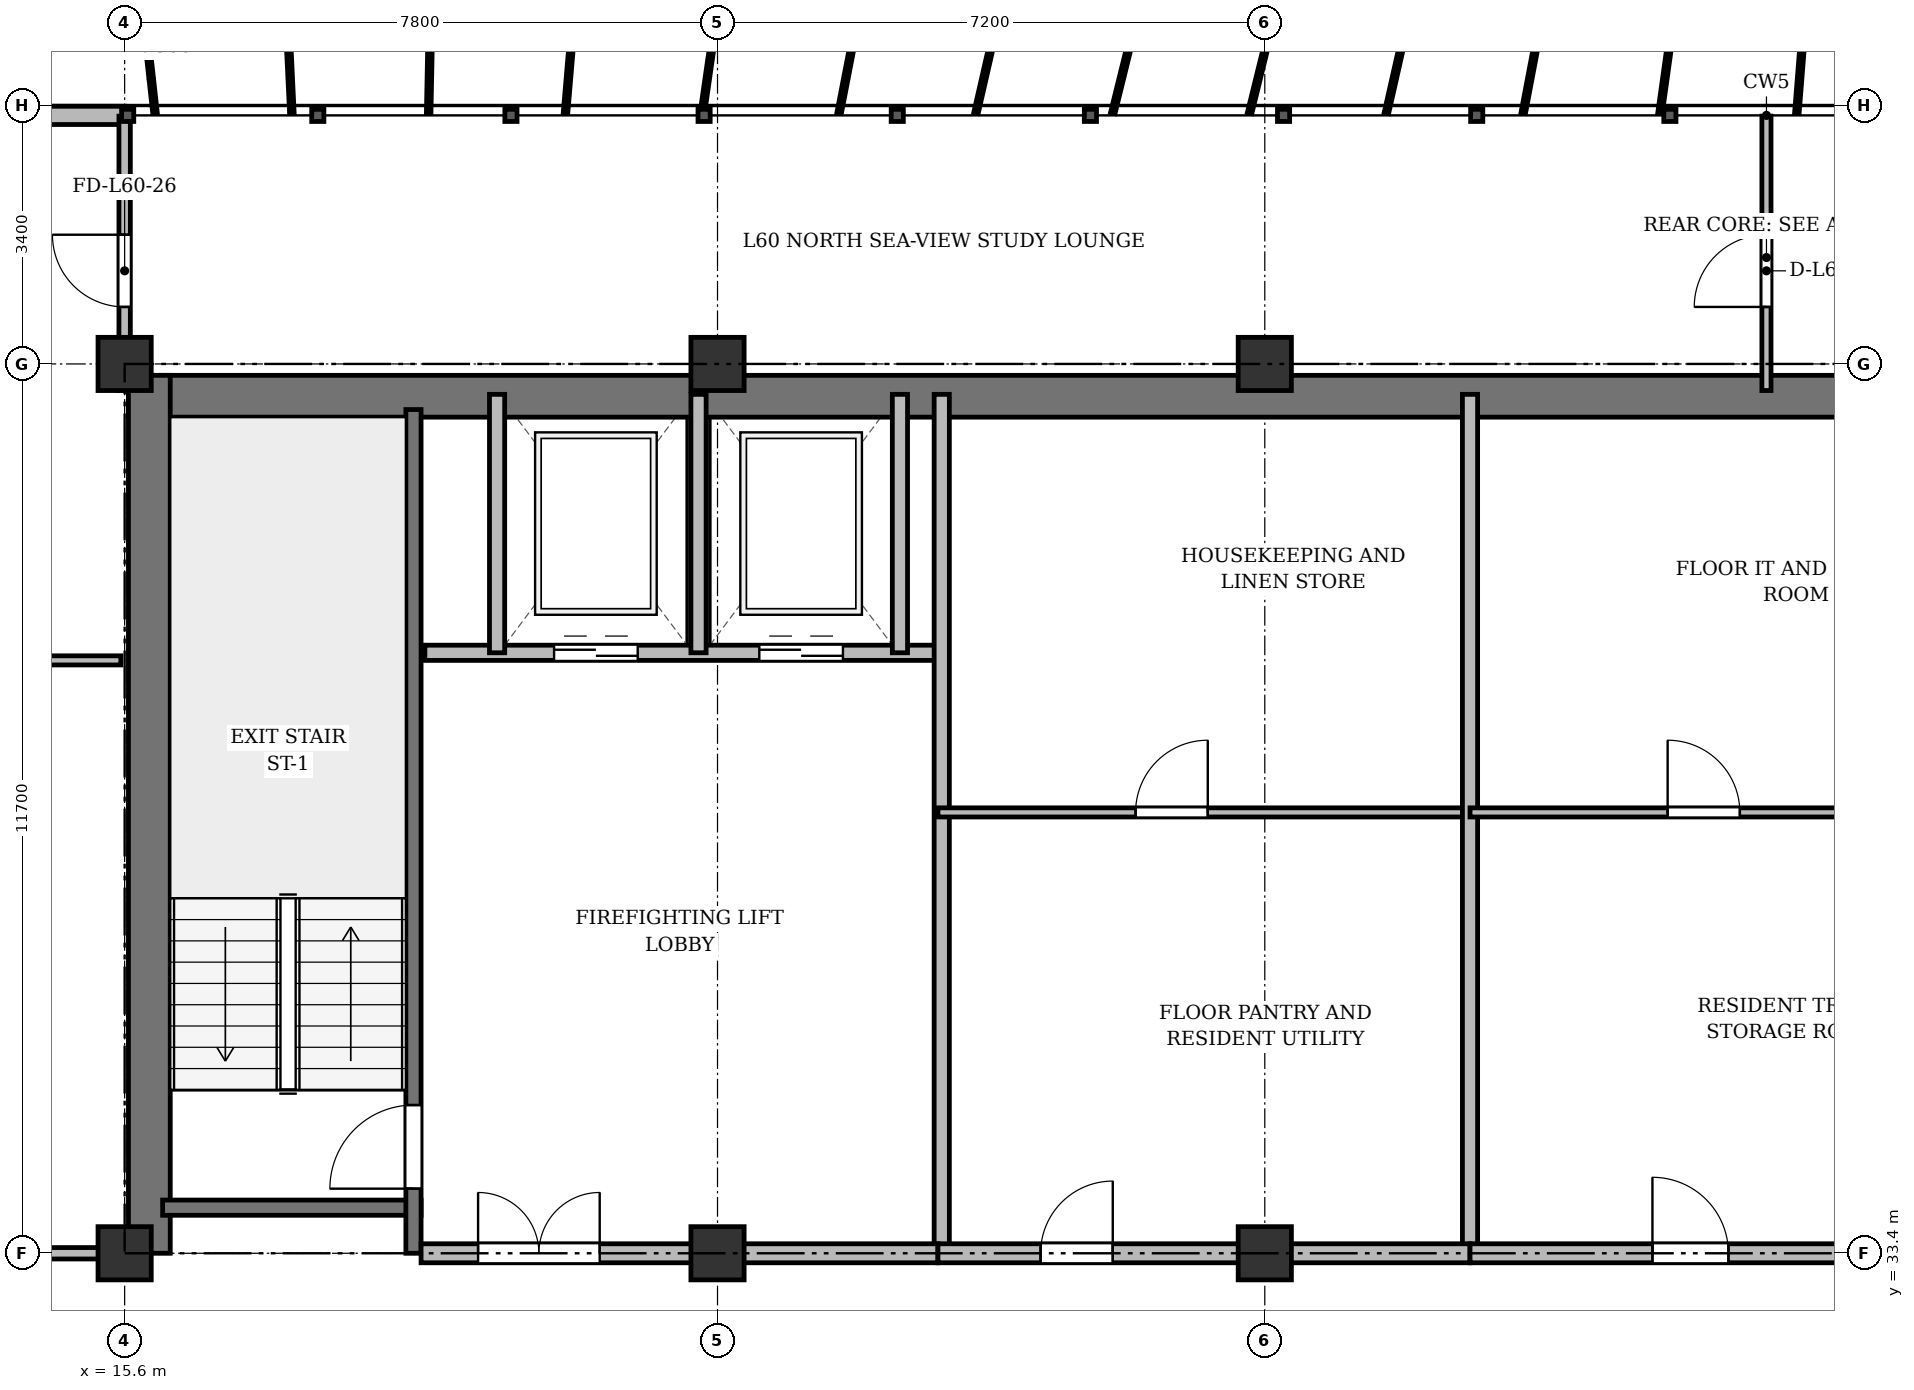
"""IFC4 building model, lengths in metres.
Left out: names, types, materials, properties, quantities, classifications, styles, units other than length and angle.
Written with IfcOpenShell. Run it as: python <this file> out.ifc"""

import sys

from ifc_helpers import new_model, si_unit, direction, frame, frame_2d, origin, origin_2d, place, context, subcontext, project, spatial, rectangle, extrude, source, transform, mapped, element, fill, save


model = new_model("IFC4")
c1 = context("Model", 3, precision=1e-05, world=origin(), true_north=direction((0.0, 1.0)))
c2 = subcontext(c1, "Body", "Model", "MODEL_VIEW")
j1 = project(units=[si_unit("LENGTHUNIT", "METRE"), si_unit("PLANEANGLEUNIT", "RADIAN")], contexts=[c1])
p1 = place(None, origin())
s1 = spatial("IfcSite", under=j1, at=p1, CompositionType="ELEMENT")
p2 = place(p1, origin())
s2 = spatial("IfcBuilding", under=s1, at=p2, CompositionType="ELEMENT")
p3 = place(p2, frame((0.0, 0.0, 230.1)))
s3 = spatial("IfcBuildingStorey", under=s2, at=p3, CompositionType="ELEMENT", Elevation=230.1)
m1 = source(origin(), c2, "Body", "SweptSolid", [
    extrude(rectangle(XDim=0.7, YDim=0.7, at=origin_2d()), origin(), (0.0, 0.0, 1.0), 3.6),
])
for number, where, z_axis, x_axis in (
    (1, (15.6, 33.4, 0.0), (0.0, 0.0, 1.0), (1.0, 0.0, 0.0)),
    (2, (15.6, 45.1, 0.0), (0.0, 0.0, 1.0), (1.0, 0.0, 0.0)),
    (3, (23.4, 33.4, 0.0), (0.0, 0.0, 1.0), (1.0, 0.0, 0.0)),
    (4, (23.4, 45.1, 0.0), (0.0, 0.0, 1.0), (1.0, 0.0, 0.0)),
    (5, (30.6, 33.4, 0.0), (0.0, 0.0, 1.0), (1.0, 0.0, 0.0)),
    (6, (30.6, 45.1, 0.0), (0.0, 0.0, 1.0), (1.0, 0.0, 0.0)),
):
    element("IfcColumn", number, at=place(p3, frame(where, z_axis=z_axis, x_axis=x_axis)), inside=s3, PredefinedType="COLUMN", context=c2, shape_type="MappedRepresentation", body=[
        mapped(m1, transform((0.0, 0.0, 0.0), x_axis=(1.0, 0.0, 0.0), y_axis=(0.0, 1.0, 0.0), z_axis=(0.0, 0.0, 1.0), scale=1.0)),
    ])
p4 = place(p3, frame((11.1, 48.37, 0.0), z_axis=(0.0, 0.0, 1.0), x_axis=(1.0, 0.0, 0.0)))
e7 = element("IfcWall", 7, at=p4, inside=s3, PredefinedType="SOLIDWALL", context=c2, shape_type="SweptSolid", body=[
    extrude(rectangle(XDim=4.5, YDim=0.24, at=frame_2d((2.25, 0.0))), origin(), (0.0, 0.0, 1.0), 3.36),
])
p5 = place(p4, frame((1.65, 0.0, 0.9)))
e8 = element("IfcOpeningElement", 8, at=p5, cuts=e7, PredefinedType="OPENING", context=c2, shape_type="SweptSolid", body=[
    extrude(rectangle(XDim=1.2, YDim=1.65, at=frame_2d((0.6, 0.825))), frame((0.0, 0.13, 0.0), z_axis=(0.0, -1.0, 0.0), x_axis=(1.0, 0.0, 0.0)), (0.0, 0.0, 1.0), 0.26),
])
p6 = place(p3, frame((15.65, 44.675, 0.0), z_axis=(0.0, 0.0, 1.0), x_axis=(1.0, 0.0, 0.0)))
e9 = element("IfcWall", 9, at=p6, inside=s3, PredefinedType="SHEAR", context=c2, shape_type="SweptSolid", body=[
    extrude(rectangle(XDim=43.1, YDim=0.55, at=frame_2d((21.55, 0.0))), origin(), (0.0, 0.0, 1.0), 3.36),
])
p7 = place(p3, frame((15.925, 33.4, 0.0), z_axis=(0.0, 0.0, 1.0), x_axis=(0.0, 1.0, 0.0)))
e10 = element("IfcWall", 10, at=p7, inside=s3, PredefinedType="SHEAR", context=c2, shape_type="SweptSolid", body=[
    extrude(rectangle(XDim=11.55, YDim=0.55, at=frame_2d((5.775, 0.0))), origin(), (0.0, 0.0, 1.0), 3.36),
])
p8 = place(p3, frame((16.1, 34.0, 0.0), z_axis=(0.0, 0.0, 1.0), x_axis=(1.0, 0.0, 0.0)))
e11 = element("IfcWall", 11, at=p8, inside=s3, PredefinedType="SHEAR", context=c2, shape_type="SweptSolid", body=[
    extrude(rectangle(XDim=3.4, YDim=0.2, at=frame_2d((1.7, 0.0))), origin(), (0.0, 0.0, 1.0), 3.36),
])
p9 = place(p3, frame((19.4, 33.4, 0.0), z_axis=(0.0, 0.0, 1.0), x_axis=(0.0, 1.0, 0.0)))
e12 = element("IfcWall", 12, at=p9, inside=s3, PredefinedType="SHEAR", context=c2, shape_type="SweptSolid", body=[
    extrude(rectangle(XDim=11.1, YDim=0.2, at=frame_2d((5.55, 0.0))), origin(), (0.0, 0.0, 1.0), 3.36),
])
p10 = place(p9, frame((0.85, 0.0, 0.0)))
e13 = element("IfcOpeningElement", 13, at=p10, cuts=e12, PredefinedType="OPENING", context=c2, shape_type="SweptSolid", body=[
    extrude(rectangle(XDim=1.1, YDim=2.15, at=frame_2d((0.55, 1.075))), frame((0.0, 0.11, 0.0), z_axis=(0.0, -1.0, 0.0), x_axis=(1.0, 0.0, 0.0)), (0.0, 0.0, 1.0), 0.22),
])
p11 = place(p3, frame((19.55, 41.3, 0.0), z_axis=(0.0, 0.0, 1.0), x_axis=(1.0, 0.0, 0.0)))
e14 = element("IfcWall", 14, at=p11, inside=s3, PredefinedType="SOLIDWALL", context=c2, shape_type="SweptSolid", body=[
    extrude(rectangle(XDim=6.75, YDim=0.2, at=frame_2d((3.375, 0.0))), origin(), (0.0, 0.0, 1.0), 3.36),
])
p12 = place(p11, frame((1.7, 0.0, 0.0)))
e15 = element("IfcOpeningElement", 15, at=p12, cuts=e14, PredefinedType="OPENING", context=c2, shape_type="SweptSolid", body=[
    extrude(rectangle(XDim=1.1, YDim=2.15, at=frame_2d((0.55, 1.075))), frame((0.0, 0.11, 0.0), z_axis=(0.0, -1.0, 0.0), x_axis=(1.0, 0.0, 0.0)), (0.0, 0.0, 1.0), 0.22),
])
p13 = place(p11, frame((4.4, 0.0, 0.0)))
e16 = element("IfcOpeningElement", 16, at=p13, cuts=e14, PredefinedType="OPENING", context=c2, shape_type="SweptSolid", body=[
    extrude(rectangle(XDim=1.1, YDim=2.15, at=frame_2d((0.55, 1.075))), frame((0.0, 0.11, 0.0), z_axis=(0.0, -1.0, 0.0), x_axis=(1.0, 0.0, 0.0)), (0.0, 0.0, 1.0), 0.22),
])
for number, where, z_axis, x_axis in (
    (17, (20.5, 41.3, 0.0), (0.0, 0.0, 1.0), (0.0, 1.0, 0.0)),
    (18, (23.15, 41.3, 0.0), (0.0, 0.0, 1.0), (0.0, 1.0, 0.0)),
    (19, (25.8, 41.3, 0.0), (0.0, 0.0, 1.0), (0.0, 1.0, 0.0)),
):
    element("IfcWall", number, at=place(p3, frame(where, z_axis=z_axis, x_axis=x_axis)), inside=s3, PredefinedType="SOLIDWALL", context=c2, shape_type="SweptSolid", body=[
        extrude(rectangle(XDim=3.4, YDim=0.2, at=frame_2d((1.7, 0.0))), origin(), (0.0, 0.0, 1.0), 3.36),
    ])
p14 = place(p3, frame((26.35, 33.4, 0.0), z_axis=(0.0, 0.0, 1.0), x_axis=(0.0, 1.0, 0.0)))
e20 = element("IfcWall", 20, at=p14, inside=s3, PredefinedType="SOLIDWALL", context=c2, shape_type="SweptSolid", body=[
    extrude(rectangle(XDim=11.3, YDim=0.2, at=frame_2d((5.65, 0.0))), origin(), (0.0, 0.0, 1.0), 2.91),
])
p15 = place(p3, frame((19.5, 33.4, 0.0), z_axis=(0.0, 0.0, 1.0), x_axis=(1.0, 0.0, 0.0)))
e21 = element("IfcWall", 21, at=p15, inside=s3, PredefinedType="PARTITIONING", context=c2, shape_type="SweptSolid", body=[
    extrude(rectangle(XDim=6.8, YDim=0.25, at=frame_2d((3.4, 0.0))), origin(), (0.0, 0.0, 1.0), 2.91),
])
p16 = place(p15, frame((0.75, 0.0, 0.0)))
e22 = element("IfcOpeningElement", 22, at=p16, cuts=e21, PredefinedType="OPENING", context=c2, shape_type="SweptSolid", body=[
    extrude(rectangle(XDim=1.6, YDim=2.2, at=frame_2d((0.8, 1.1))), frame((0.0, 0.135, 0.0), z_axis=(0.0, -1.0, 0.0), x_axis=(1.0, 0.0, 0.0)), (0.0, 0.0, 1.0), 0.27),
])
p17 = place(p3, frame((26.3, 39.2, 0.0), z_axis=(0.0, 0.0, 1.0), x_axis=(1.0, 0.0, 0.0)))
e23 = element("IfcWall", 23, at=p17, inside=s3, PredefinedType="PARTITIONING", context=c2, shape_type="SweptSolid", body=[
    extrude(rectangle(XDim=7.0, YDim=0.12, at=frame_2d((3.5, 0.0))), origin(), (0.0, 0.0, 1.0), 2.86),
])
p18 = place(p17, frame((2.6, 0.0, 0.0)))
e24 = element("IfcOpeningElement", 24, at=p18, cuts=e23, PredefinedType="OPENING", context=c2, shape_type="SweptSolid", body=[
    extrude(rectangle(XDim=0.95, YDim=2.15, at=frame_2d((0.475, 1.075))), frame((0.0, 0.07, 0.0), z_axis=(0.0, -1.0, 0.0), x_axis=(1.0, 0.0, 0.0)), (0.0, 0.0, 1.0), 0.14),
])
p19 = place(p3, frame((33.3, 33.4, 0.0), z_axis=(0.0, 0.0, 1.0), x_axis=(0.0, 1.0, 0.0)))
e25 = element("IfcWall", 25, at=p19, inside=s3, PredefinedType="SOLIDWALL", context=c2, shape_type="SweptSolid", body=[
    extrude(rectangle(XDim=11.3, YDim=0.2, at=frame_2d((5.65, 0.0))), origin(), (0.0, 0.0, 1.0), 2.91),
])
p20 = place(p3, frame((33.3, 39.2, 0.0), z_axis=(0.0, 0.0, 1.0), x_axis=(1.0, 0.0, 0.0)))
e26 = element("IfcWall", 26, at=p20, inside=s3, PredefinedType="PARTITIONING", context=c2, shape_type="SweptSolid", body=[
    extrude(rectangle(XDim=6.8, YDim=0.12, at=frame_2d((3.4, 0.0))), origin(), (0.0, 0.0, 1.0), 3.36),
])
p21 = place(p20, frame((2.6, 0.0, 0.0)))
e27 = element("IfcOpeningElement", 27, at=p21, cuts=e26, PredefinedType="OPENING", context=c2, shape_type="SweptSolid", body=[
    extrude(rectangle(XDim=0.95, YDim=2.15, at=frame_2d((0.475, 1.075))), frame((0.0, 0.07, 0.0), z_axis=(0.0, -1.0, 0.0), x_axis=(1.0, 0.0, 0.0)), (0.0, 0.0, 1.0), 0.14),
])
p22 = place(p3, frame((26.3, 33.4, 0.0), z_axis=(0.0, 0.0, 1.0), x_axis=(1.0, 0.0, 0.0)))
e28 = element("IfcWall", 28, at=p22, inside=s3, PredefinedType="PARTITIONING", context=c2, shape_type="SweptSolid", body=[
    extrude(rectangle(XDim=7.0, YDim=0.25, at=frame_2d((3.5, 0.0))), origin(), (0.0, 0.0, 1.0), 2.91),
])
p23 = place(p22, frame((1.35, 0.0, 0.0)))
e29 = element("IfcOpeningElement", 29, at=p23, cuts=e28, PredefinedType="OPENING", context=c2, shape_type="SweptSolid", body=[
    extrude(rectangle(XDim=0.95, YDim=2.15, at=frame_2d((0.475, 1.075))), frame((0.0, 0.135, 0.0), z_axis=(0.0, -1.0, 0.0), x_axis=(1.0, 0.0, 0.0)), (0.0, 0.0, 1.0), 0.27),
])
p24 = place(p3, frame((33.3, 33.4, 0.0), z_axis=(0.0, 0.0, 1.0), x_axis=(1.0, 0.0, 0.0)))
e30 = element("IfcWall", 30, at=p24, inside=s3, PredefinedType="PARTITIONING", context=c2, shape_type="SweptSolid", body=[
    extrude(rectangle(XDim=6.8, YDim=0.25, at=frame_2d((3.4, 0.0))), origin(), (0.0, 0.0, 1.0), 2.91),
])
p25 = place(p24, frame((2.4, 0.0, 0.0)))
e31 = element("IfcOpeningElement", 31, at=p25, cuts=e30, PredefinedType="OPENING", context=c2, shape_type="SweptSolid", body=[
    extrude(rectangle(XDim=1.0, YDim=2.15, at=frame_2d((0.5, 1.075))), frame((0.0, 0.135, 0.0), z_axis=(0.0, -1.0, 0.0), x_axis=(1.0, 0.0, 0.0)), (0.0, 0.0, 1.0), 0.27),
])
p26 = place(p3, frame((8.3, 41.2, 0.0), z_axis=(0.0, 0.0, 1.0), x_axis=(1.0, 0.0, 0.0)))
e32 = element("IfcWall", 32, at=p26, inside=s3, PredefinedType="PARTITIONING", context=c2, shape_type="SweptSolid", body=[
    extrude(rectangle(XDim=7.25, YDim=0.12, at=frame_2d((3.625, 0.0))), origin(), (0.0, 0.0, 1.0), 2.86),
])
p27 = place(p26, frame((3.15, 0.0, 0.0)))
e33 = element("IfcOpeningElement", 33, at=p27, cuts=e32, PredefinedType="OPENING", context=c2, shape_type="SweptSolid", body=[
    extrude(rectangle(XDim=0.95, YDim=2.15, at=frame_2d((0.475, 1.075))), frame((0.0, 0.07, 0.0), z_axis=(0.0, -1.0, 0.0), x_axis=(1.0, 0.0, 0.0)), (0.0, 0.0, 1.0), 0.14),
])
p28 = place(p3, frame((8.25, 33.4, 0.0), z_axis=(0.0, 0.0, 1.0), x_axis=(1.0, 0.0, 0.0)))
e34 = element("IfcWall", 34, at=p28, inside=s3, PredefinedType="PARTITIONING", context=c2, shape_type="SweptSolid", body=[
    extrude(rectangle(XDim=7.35, YDim=0.15, at=frame_2d((3.675, 0.0))), origin(), (0.0, 0.0, 1.0), 2.91),
])
p29 = place(p28, frame((3.192, 0.0, 0.0)))
e35 = element("IfcOpeningElement", 35, at=p29, cuts=e34, PredefinedType="OPENING", context=c2, shape_type="SweptSolid", body=[
    extrude(rectangle(XDim=0.95, YDim=2.15, at=frame_2d((0.475, 1.075))), frame((0.0, 0.085, 0.0), z_axis=(0.0, -1.0, 0.0), x_axis=(1.0, 0.0, 0.0)), (0.0, 0.0, 1.0), 0.17),
])
p30 = place(p3, frame((37.2, 44.75, 0.0), z_axis=(0.0, 0.0, 1.0), x_axis=(0.0, 1.0, 0.0)))
e36 = element("IfcWall", 36, at=p30, inside=s3, PredefinedType="PARTITIONING", context=c2, shape_type="SweptSolid", body=[
    extrude(rectangle(XDim=3.61, YDim=0.12, at=frame_2d((1.805, 0.0))), origin(), (0.0, 0.0, 1.0), 2.91),
])
p31 = place(p30, frame((1.1, 0.0, 0.0)))
e37 = element("IfcOpeningElement", 37, at=p31, cuts=e36, PredefinedType="OPENING", context=c2, shape_type="SweptSolid", body=[
    extrude(rectangle(XDim=0.95, YDim=2.15, at=frame_2d((0.475, 1.075))), frame((0.0, 0.07, 0.0), z_axis=(0.0, -1.0, 0.0), x_axis=(1.0, 0.0, 0.0)), (0.0, 0.0, 1.0), 0.14),
])
p32 = place(p3, frame((15.6, 44.75, 0.0), z_axis=(0.0, 0.0, 1.0), x_axis=(0.0, 1.0, 0.0)))
e38 = element("IfcWall", 38, at=p32, inside=s3, PredefinedType="PARTITIONING", context=c2, shape_type="SweptSolid", body=[
    extrude(rectangle(XDim=3.61, YDim=0.15, at=frame_2d((1.805, 0.0))), origin(), (0.0, 0.0, 1.0), 2.86),
])
p33 = place(p32, frame((1.1, 0.0, 0.0)))
e39 = element("IfcOpeningElement", 39, at=p33, cuts=e38, PredefinedType="OPENING", context=c2, shape_type="SweptSolid", body=[
    extrude(rectangle(XDim=0.95, YDim=2.15, at=frame_2d((0.475, 1.075))), frame((0.0, 0.085, 0.0), z_axis=(0.0, -1.0, 0.0), x_axis=(1.0, 0.0, 0.0)), (0.0, 0.0, 1.0), 0.17),
])
m2 = source(origin(), c2, "Body", "SweptSolid", [
    extrude(rectangle(XDim=1.1, YDim=2.15, at=frame_2d((0.55, 1.075))), frame((0.0, 0.025, 0.0), z_axis=(0.0, -1.0, 0.0), x_axis=(1.0, 0.0, 0.0)), (0.0, 0.0, 1.0), 0.05),
])
p34 = place(p10, origin())
e40 = element("IfcDoor", 40, at=p34, inside=s3, OperationType="SINGLE_SWING_LEFT", PredefinedType="DOOR", context=c2, shape_type="MappedRepresentation", body=[
    mapped(m2, transform((0.0, 0.0, 0.0), x_axis=(1.0, 0.0, 0.0), y_axis=(0.0, 1.0, 0.0), z_axis=(0.0, 0.0, 1.0), scale=1.0)),
])
fill(e13, e40)
p35 = place(p12, origin())
e41 = element("IfcDoor", 41, at=p35, inside=s3, OperationType="DOUBLE_DOOR_SLIDING", PredefinedType="DOOR", context=c2, shape_type="MappedRepresentation", body=[
    mapped(m2, transform((0.0, 0.0, 0.0), x_axis=(1.0, 0.0, 0.0), y_axis=(0.0, 1.0, 0.0), z_axis=(0.0, 0.0, 1.0), scale=1.0)),
])
fill(e15, e41)
p36 = place(p13, origin())
e42 = element("IfcDoor", 42, at=p36, inside=s3, OperationType="DOUBLE_DOOR_SLIDING", PredefinedType="DOOR", context=c2, shape_type="MappedRepresentation", body=[
    mapped(m2, transform((0.0, 0.0, 0.0), x_axis=(1.0, 0.0, 0.0), y_axis=(0.0, 1.0, 0.0), z_axis=(0.0, 0.0, 1.0), scale=1.0)),
])
fill(e16, e42)
m3 = source(origin(), c2, "Body", "SweptSolid", [
    extrude(rectangle(XDim=1.6, YDim=2.2, at=frame_2d((0.8, 1.1))), frame((0.0, 0.025, 0.0), z_axis=(0.0, -1.0, 0.0), x_axis=(1.0, 0.0, 0.0)), (0.0, 0.0, 1.0), 0.05),
])
p37 = place(p16, origin())
e43 = element("IfcDoor", 43, at=p37, inside=s3, OperationType="DOUBLE_DOOR_SINGLE_SWING", PredefinedType="DOOR", context=c2, shape_type="MappedRepresentation", body=[
    mapped(m3, transform((0.0, 0.0, 0.0), x_axis=(1.0, 0.0, 0.0), y_axis=(0.0, 1.0, 0.0), z_axis=(0.0, 0.0, 1.0), scale=1.0)),
])
fill(e22, e43)
m4 = source(origin(), c2, "Body", "SweptSolid", [
    extrude(rectangle(XDim=0.95, YDim=2.15, at=frame_2d((0.475, 1.075))), frame((0.0, 0.025, 0.0), z_axis=(0.0, -1.0, 0.0), x_axis=(1.0, 0.0, 0.0)), (0.0, 0.0, 1.0), 0.05),
])
p38 = place(p18, origin())
e44 = element("IfcDoor", 44, at=p38, inside=s3, OperationType="SINGLE_SWING_RIGHT", PredefinedType="DOOR", context=c2, shape_type="MappedRepresentation", body=[
    mapped(m4, transform((0.0, 0.0, 0.0), x_axis=(1.0, 0.0, 0.0), y_axis=(0.0, 1.0, 0.0), z_axis=(0.0, 0.0, 1.0), scale=1.0)),
])
fill(e24, e44)
p39 = place(p21, origin())
e45 = element("IfcDoor", 45, at=p39, inside=s3, OperationType="SINGLE_SWING_LEFT", PredefinedType="DOOR", context=c2, shape_type="MappedRepresentation", body=[
    mapped(m4, transform((0.0, 0.0, 0.0), x_axis=(1.0, 0.0, 0.0), y_axis=(0.0, 1.0, 0.0), z_axis=(0.0, 0.0, 1.0), scale=1.0)),
])
fill(e27, e45)
p40 = place(p23, origin())
e46 = element("IfcDoor", 46, at=p40, inside=s3, OperationType="SINGLE_SWING_RIGHT", PredefinedType="DOOR", context=c2, shape_type="MappedRepresentation", body=[
    mapped(m4, transform((0.0, 0.0, 0.0), x_axis=(1.0, 0.0, 0.0), y_axis=(0.0, 1.0, 0.0), z_axis=(0.0, 0.0, 1.0), scale=1.0)),
])
fill(e29, e46)
m5 = source(origin(), c2, "Body", "SweptSolid", [
    extrude(rectangle(XDim=1.0, YDim=2.15, at=frame_2d((0.5, 1.075))), frame((0.0, 0.025, 0.0), z_axis=(0.0, -1.0, 0.0), x_axis=(1.0, 0.0, 0.0)), (0.0, 0.0, 1.0), 0.05),
])
p41 = place(p25, origin())
e47 = element("IfcDoor", 47, at=p41, inside=s3, OperationType="SINGLE_SWING_LEFT", PredefinedType="DOOR", context=c2, shape_type="MappedRepresentation", body=[
    mapped(m5, transform((0.0, 0.0, 0.0), x_axis=(1.0, 0.0, 0.0), y_axis=(0.0, 1.0, 0.0), z_axis=(0.0, 0.0, 1.0), scale=1.0)),
])
fill(e31, e47)
p42 = place(p31, origin())
e48 = element("IfcDoor", 48, at=p42, inside=s3, OperationType="SINGLE_SWING_LEFT", PredefinedType="DOOR", context=c2, shape_type="MappedRepresentation", body=[
    mapped(m4, transform((0.0, 0.0, 0.0), x_axis=(1.0, 0.0, 0.0), y_axis=(0.0, 1.0, 0.0), z_axis=(0.0, 0.0, 1.0), scale=1.0)),
])
fill(e37, e48)
p43 = place(p33, origin())
e49 = element("IfcDoor", 49, at=p43, inside=s3, OperationType="SINGLE_SWING_RIGHT", PredefinedType="DOOR", context=c2, shape_type="MappedRepresentation", body=[
    mapped(m4, transform((0.0, 0.0, 0.0), x_axis=(1.0, 0.0, 0.0), y_axis=(0.0, 1.0, 0.0), z_axis=(0.0, 0.0, 1.0), scale=1.0)),
])
fill(e39, e49)
save(model, sys.argv[1])
